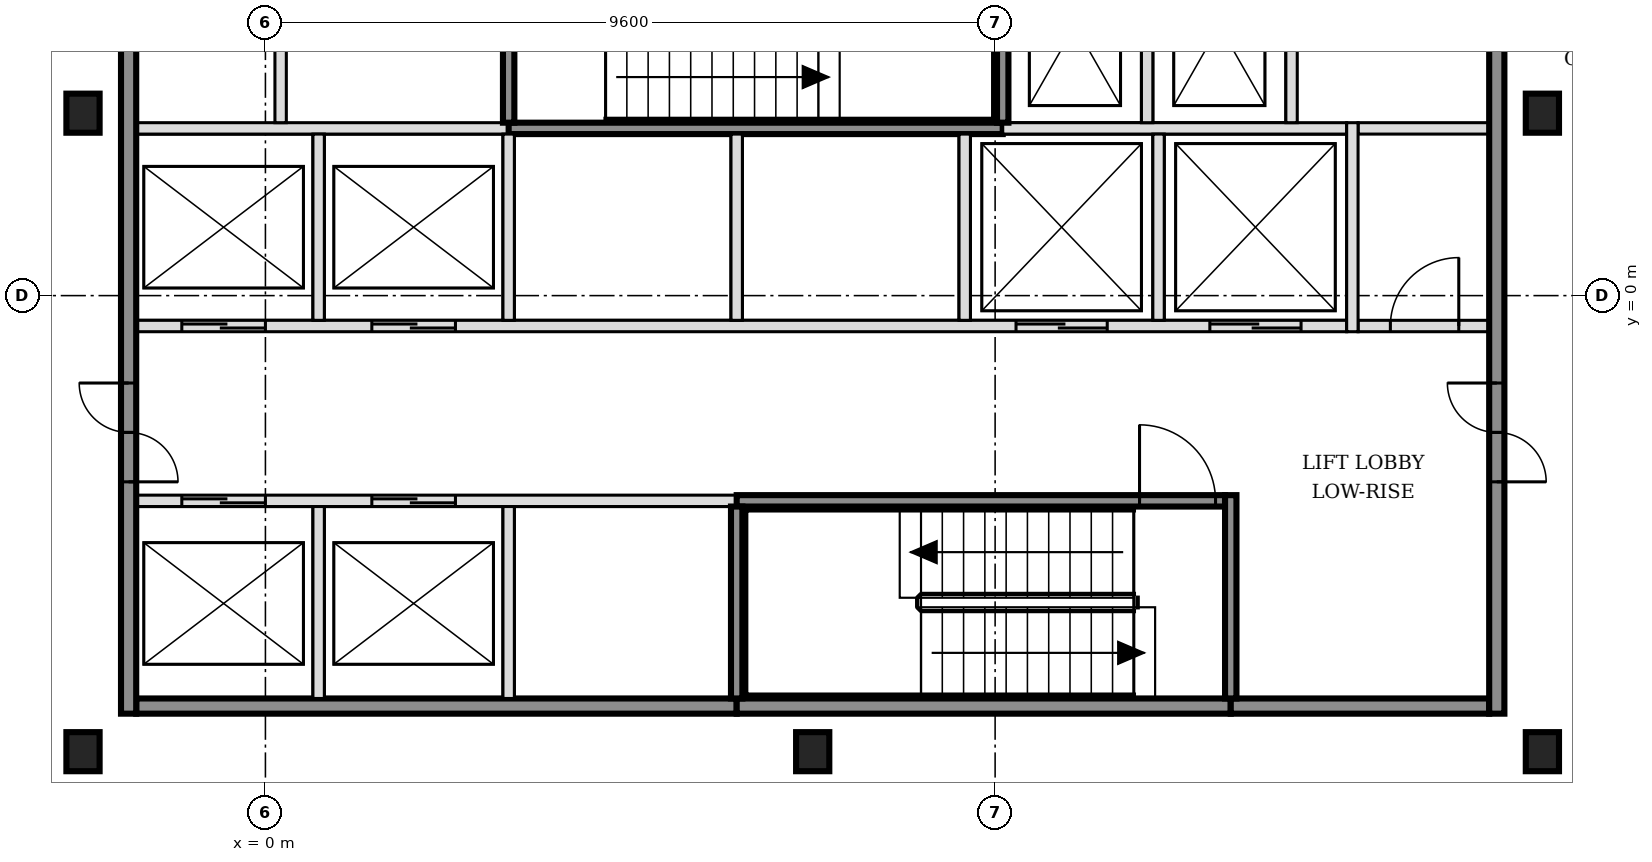
"""IFC4 building model, lengths in metres.
Left out: names, types, materials, properties, quantities, classifications, styles, units other than length and angle.
Written with IfcOpenShell. Run it as: python <this file> out.ifc"""

import sys

from ifc_helpers import new_model, si_unit, direction, frame, frame_2d, origin, origin_2d, place, context, subcontext, project, spatial, rectangle, i_section, extrude, element, fill, save


model = new_model("IFC4")
c1 = context("Model", 3, precision=1e-05, world=origin(), true_north=direction((0.0, 1.0)))
c2 = subcontext(c1, "Body", "Model", "MODEL_VIEW")
j1 = project(units=[si_unit("LENGTHUNIT", "METRE"), si_unit("PLANEANGLEUNIT", "RADIAN")], contexts=[c1])
p1 = place(None, origin())
s1 = spatial("IfcSite", under=j1, at=p1, CompositionType="ELEMENT")
p2 = place(p1, origin())
s2 = spatial("IfcBuilding", under=s1, at=p2, CompositionType="ELEMENT")
p3 = place(p2, frame((0.0, 0.0, 69.0)))
s3 = spatial("IfcBuildingStorey", under=s2, at=p3, CompositionType="ELEMENT", Elevation=69.0)
for number, where, z_axis, x_axis in (
    (1, (-2.4, -6.0, -0.15), (0.0, 0.0, 1.0), (1.0, 0.0, 0.0)),
    (2, (7.2, -6.0, -0.15), (0.0, 0.0, 1.0), (1.0, 0.0, 0.0)),
    (3, (16.8, -6.0, -0.15), (0.0, 0.0, 1.0), (1.0, 0.0, 0.0)),
    (4, (-2.4, 2.4, -0.15), (0.0, 0.0, 1.0), (1.0, 0.0, 0.0)),
    (5, (16.8, 2.4, -0.15), (0.0, 0.0, 1.0), (1.0, 0.0, 0.0)),
):
    element("IfcColumn", number, at=place(p3, frame(where, z_axis=z_axis, x_axis=x_axis)), inside=s3, PredefinedType="COLUMN", context=c2, shape_type="SweptSolid", body=[
        extrude(i_section(OverallWidth=0.437, OverallDepth=0.514, WebThickness=0.061, FlangeThickness=0.097, FilletRadius=0.015, at=origin_2d()), origin(), (0.0, 0.0, 1.0), 3.6),
    ])
p4 = place(p3, frame((-1.7, -5.4, 0.0), z_axis=(0.0, 0.0, 1.0), x_axis=(1.0, 0.0, 0.0)))
e6 = element("IfcWall", 6, at=p4, inside=s3, PredefinedType="SOLIDWALL", context=c2, shape_type="SweptSolid", body=[
    extrude(rectangle(XDim=7.9, YDim=0.2, at=frame_2d((3.95, 0.0))), origin(), (0.0, 0.0, 1.0), 3.45),
])
p5 = place(p3, frame((6.2, -5.4, 0.0), z_axis=(0.0, 0.0, 1.0), x_axis=(1.0, 0.0, 0.0)))
e7 = element("IfcWall", 7, at=p5, inside=s3, PredefinedType="SOLIDWALL", context=c2, shape_type="SweptSolid", body=[
    extrude(rectangle(XDim=6.5, YDim=0.2, at=frame_2d((3.25, 0.0))), origin(), (0.0, 0.0, 1.0), 3.45),
])
p6 = place(p3, frame((12.7, -5.4, 0.0), z_axis=(0.0, 0.0, 1.0), x_axis=(1.0, 0.0, 0.0)))
e8 = element("IfcWall", 8, at=p6, inside=s3, PredefinedType="SOLIDWALL", context=c2, shape_type="SweptSolid", body=[
    extrude(rectangle(XDim=3.4, YDim=0.2, at=frame_2d((1.7, 0.0))), origin(), (0.0, 0.0, 1.0), 3.45),
])
p7 = place(p3, frame((-1.7, -2.7, 0.0), z_axis=(0.0, 0.0, 1.0), x_axis=(1.0, 0.0, 0.0)))
e9 = element("IfcWall", 9, at=p7, inside=s3, PredefinedType="SOLIDWALL", context=c2, shape_type="SweptSolid", body=[
    extrude(rectangle(XDim=7.9, YDim=0.15, at=frame_2d((3.95, 0.0))), origin(), (0.0, 0.0, 1.0), 3.45),
])
p8 = place(p7, frame((0.6, 0.0, 0.0)))
e10 = element("IfcOpeningElement", 10, at=p8, cuts=e9, PredefinedType="OPENING", context=c2, shape_type="SweptSolid", body=[
    extrude(rectangle(XDim=1.1, YDim=2.1, at=frame_2d((0.55, 1.05))), frame((0.0, 0.085, 0.0), z_axis=(0.0, -1.0, 0.0), x_axis=(1.0, 0.0, 0.0)), (0.0, 0.0, 1.0), 0.17),
])
p9 = place(p7, frame((3.1, 0.0, 0.0)))
e11 = element("IfcOpeningElement", 11, at=p9, cuts=e9, PredefinedType="OPENING", context=c2, shape_type="SweptSolid", body=[
    extrude(rectangle(XDim=1.1, YDim=2.1, at=frame_2d((0.55, 1.05))), frame((0.0, 0.085, 0.0), z_axis=(0.0, -1.0, 0.0), x_axis=(1.0, 0.0, 0.0)), (0.0, 0.0, 1.0), 0.17),
])
p10 = place(p3, frame((6.2, -2.7, 0.0), z_axis=(0.0, 0.0, 1.0), x_axis=(1.0, 0.0, 0.0)))
e12 = element("IfcWall", 12, at=p10, inside=s3, PredefinedType="SOLIDWALL", context=c2, shape_type="SweptSolid", body=[
    extrude(rectangle(XDim=6.425, YDim=0.15, at=frame_2d((3.212, 0.0))), origin(), (0.0, 0.0, 1.0), 3.45),
])
p11 = place(p10, frame((5.3, 0.0, 0.0)))
e13 = element("IfcOpeningElement", 13, at=p11, cuts=e12, PredefinedType="OPENING", context=c2, shape_type="SweptSolid", body=[
    extrude(rectangle(XDim=1.0, YDim=2.1, at=frame_2d((0.5, 1.05))), frame((0.0, 0.085, 0.0), z_axis=(0.0, -1.0, 0.0), x_axis=(1.0, 0.0, 0.0)), (0.0, 0.0, 1.0), 0.17),
])
p12 = place(p3, frame((-1.7, -0.4, 0.0), z_axis=(0.0, 0.0, 1.0), x_axis=(1.0, 0.0, 0.0)))
e14 = element("IfcWall", 14, at=p12, inside=s3, PredefinedType="SOLIDWALL", context=c2, shape_type="SweptSolid", body=[
    extrude(rectangle(XDim=15.925, YDim=0.15, at=frame_2d((7.962, 0.0))), origin(), (0.0, 0.0, 1.0), 3.45),
])
p13 = place(p12, frame((0.6, 0.0, 0.0)))
e15 = element("IfcOpeningElement", 15, at=p13, cuts=e14, PredefinedType="OPENING", context=c2, shape_type="SweptSolid", body=[
    extrude(rectangle(XDim=1.1, YDim=2.1, at=frame_2d((0.55, 1.05))), frame((0.0, 0.085, 0.0), z_axis=(0.0, -1.0, 0.0), x_axis=(1.0, 0.0, 0.0)), (0.0, 0.0, 1.0), 0.17),
])
p14 = place(p12, frame((3.1, 0.0, 0.0)))
e16 = element("IfcOpeningElement", 16, at=p14, cuts=e14, PredefinedType="OPENING", context=c2, shape_type="SweptSolid", body=[
    extrude(rectangle(XDim=1.1, YDim=2.1, at=frame_2d((0.55, 1.05))), frame((0.0, 0.085, 0.0), z_axis=(0.0, -1.0, 0.0), x_axis=(1.0, 0.0, 0.0)), (0.0, 0.0, 1.0), 0.17),
])
p15 = place(p12, frame((11.575, 0.0, 0.0)))
e17 = element("IfcOpeningElement", 17, at=p15, cuts=e14, PredefinedType="OPENING", context=c2, shape_type="SweptSolid", body=[
    extrude(rectangle(XDim=1.2, YDim=2.1, at=frame_2d((0.6, 1.05))), frame((0.0, 0.085, 0.0), z_axis=(0.0, -1.0, 0.0), x_axis=(1.0, 0.0, 0.0)), (0.0, 0.0, 1.0), 0.17),
])
p16 = place(p12, frame((14.125, 0.0, 0.0)))
e18 = element("IfcOpeningElement", 18, at=p16, cuts=e14, PredefinedType="OPENING", context=c2, shape_type="SweptSolid", body=[
    extrude(rectangle(XDim=1.2, YDim=2.1, at=frame_2d((0.6, 1.05))), frame((0.0, 0.085, 0.0), z_axis=(0.0, -1.0, 0.0), x_axis=(1.0, 0.0, 0.0)), (0.0, 0.0, 1.0), 0.17),
])
p17 = place(p3, frame((14.375, -0.4, 0.0), z_axis=(0.0, 0.0, 1.0), x_axis=(1.0, 0.0, 0.0)))
e19 = element("IfcWall", 19, at=p17, inside=s3, PredefinedType="PARTITIONING", context=c2, shape_type="SweptSolid", body=[
    extrude(rectangle(XDim=1.725, YDim=0.15, at=frame_2d((0.863, 0.0))), origin(), (0.0, 0.0, 1.0), 3.45),
])
p18 = place(p17, frame((0.425, 0.0, 0.0)))
e20 = element("IfcOpeningElement", 20, at=p18, cuts=e19, PredefinedType="OPENING", context=c2, shape_type="SweptSolid", body=[
    extrude(rectangle(XDim=0.9, YDim=2.1, at=frame_2d((0.45, 1.05))), frame((0.0, 0.085, 0.0), z_axis=(0.0, -1.0, 0.0), x_axis=(1.0, 0.0, 0.0)), (0.0, 0.0, 1.0), 0.17),
])
p19 = place(p3, frame((-1.7, 2.2, 0.0), z_axis=(0.0, 0.0, 1.0), x_axis=(1.0, 0.0, 0.0)))
e21 = element("IfcWall", 21, at=p19, inside=s3, PredefinedType="SOLIDWALL", context=c2, shape_type="SweptSolid", body=[
    extrude(rectangle(XDim=4.9, YDim=0.15, at=frame_2d((2.45, 0.0))), origin(), (0.0, 0.0, 1.0), 3.45),
])
p20 = place(p3, frame((3.2, 2.2, 0.0), z_axis=(0.0, 0.0, 1.0), x_axis=(1.0, 0.0, 0.0)))
e22 = element("IfcWall", 22, at=p20, inside=s3, PredefinedType="SOLIDWALL", context=c2, shape_type="SweptSolid", body=[
    extrude(rectangle(XDim=6.5, YDim=0.15, at=frame_2d((3.25, 0.0))), origin(), (0.0, 0.0, 1.0), 3.45),
])
p21 = place(p3, frame((9.7, 2.2, 0.0), z_axis=(0.0, 0.0, 1.0), x_axis=(1.0, 0.0, 0.0)))
e23 = element("IfcWall", 23, at=p21, inside=s3, PredefinedType="SOLIDWALL", context=c2, shape_type="SweptSolid", body=[
    extrude(rectangle(XDim=4.525, YDim=0.15, at=frame_2d((2.263, 0.0))), origin(), (0.0, 0.0, 1.0), 3.45),
])
p22 = place(p3, frame((14.375, 2.2, 0.0), z_axis=(0.0, 0.0, 1.0), x_axis=(1.0, 0.0, 0.0)))
e24 = element("IfcWall", 24, at=p22, inside=s3, PredefinedType="PARTITIONING", context=c2, shape_type="SweptSolid", body=[
    extrude(rectangle(XDim=1.725, YDim=0.15, at=frame_2d((0.863, 0.0))), origin(), (0.0, 0.0, 1.0), 3.45),
])
p23 = place(p3, frame((-1.8, -5.5, 0.0), z_axis=(0.0, 0.0, 1.0), x_axis=(0.0, 1.0, 0.0)))
e25 = element("IfcWall", 25, at=p23, inside=s3, PredefinedType="SOLIDWALL", context=c2, shape_type="SweptSolid", body=[
    extrude(rectangle(XDim=15.8, YDim=0.2, at=frame_2d((7.9, 0.0))), origin(), (0.0, 0.0, 1.0), 3.45),
])
p24 = place(p23, frame((3.05, 0.0, 0.0)))
e26 = element("IfcOpeningElement", 26, at=p24, cuts=e25, PredefinedType="OPENING", context=c2, shape_type="SweptSolid", body=[
    extrude(rectangle(XDim=1.3, YDim=2.1, at=frame_2d((0.65, 1.05))), frame((0.0, 0.11, 0.0), z_axis=(0.0, -1.0, 0.0), x_axis=(1.0, 0.0, 0.0)), (0.0, 0.0, 1.0), 0.22),
])
p25 = place(p23, frame((11.45, 0.0, 0.0)))
e27 = element("IfcOpeningElement", 27, at=p25, cuts=e25, PredefinedType="OPENING", context=c2, shape_type="SweptSolid", body=[
    extrude(rectangle(XDim=1.3, YDim=2.1, at=frame_2d((0.65, 1.05))), frame((0.0, 0.11, 0.0), z_axis=(0.0, -1.0, 0.0), x_axis=(1.0, 0.0, 0.0)), (0.0, 0.0, 1.0), 0.22),
])
p26 = place(p3, frame((0.2, 2.275, 0.0), z_axis=(0.0, 0.0, 1.0), x_axis=(0.0, 1.0, 0.0)))
e28 = element("IfcWall", 28, at=p26, inside=s3, PredefinedType="PARTITIONING", context=c2, shape_type="SweptSolid", body=[
    extrude(rectangle(XDim=2.55, YDim=0.15, at=frame_2d((1.275, 0.0))), origin(), (0.0, 0.0, 1.0), 3.45),
])
p27 = place(p3, frame((0.7, -5.3, 0.0), z_axis=(0.0, 0.0, 1.0), x_axis=(0.0, 1.0, 0.0)))
e29 = element("IfcWall", 29, at=p27, inside=s3, PredefinedType="SOLIDWALL", context=c2, shape_type="SweptSolid", body=[
    extrude(rectangle(XDim=2.525, YDim=0.15, at=frame_2d((1.263, 0.0))), origin(), (0.0, 0.0, 1.0), 3.45),
])
p28 = place(p3, frame((0.7, -0.325, 0.0), z_axis=(0.0, 0.0, 1.0), x_axis=(0.0, 1.0, 0.0)))
e30 = element("IfcWall", 30, at=p28, inside=s3, PredefinedType="SOLIDWALL", context=c2, shape_type="SweptSolid", body=[
    extrude(rectangle(XDim=2.45, YDim=0.15, at=frame_2d((1.225, 0.0))), origin(), (0.0, 0.0, 1.0), 3.45),
])
p29 = place(p3, frame((3.2, -5.3, 0.0), z_axis=(0.0, 0.0, 1.0), x_axis=(0.0, 1.0, 0.0)))
e31 = element("IfcWall", 31, at=p29, inside=s3, PredefinedType="SOLIDWALL", context=c2, shape_type="SweptSolid", body=[
    extrude(rectangle(XDim=2.525, YDim=0.15, at=frame_2d((1.263, 0.0))), origin(), (0.0, 0.0, 1.0), 3.45),
])
p30 = place(p3, frame((3.2, -0.325, 0.0), z_axis=(0.0, 0.0, 1.0), x_axis=(0.0, 1.0, 0.0)))
e32 = element("IfcWall", 32, at=p30, inside=s3, PredefinedType="SOLIDWALL", context=c2, shape_type="SweptSolid", body=[
    extrude(rectangle(XDim=2.45, YDim=0.15, at=frame_2d((1.225, 0.0))), origin(), (0.0, 0.0, 1.0), 3.45),
])
p31 = place(p3, frame((3.2, 2.275, 0.0), z_axis=(0.0, 0.0, 1.0), x_axis=(0.0, 1.0, 0.0)))
e33 = element("IfcWall", 33, at=p31, inside=s3, PredefinedType="SOLIDWALL", context=c2, shape_type="SweptSolid", body=[
    extrude(rectangle(XDim=2.7, YDim=0.15, at=frame_2d((1.35, 0.0))), origin(), (0.0, 0.0, 1.0), 3.45),
])
p32 = place(p3, frame((6.2, -5.3, 0.0), z_axis=(0.0, 0.0, 1.0), x_axis=(0.0, 1.0, 0.0)))
e34 = element("IfcWall", 34, at=p32, inside=s3, PredefinedType="SOLIDWALL", context=c2, shape_type="SweptSolid", body=[
    extrude(rectangle(XDim=2.525, YDim=0.15, at=frame_2d((1.263, 0.0))), origin(), (0.0, 0.0, 1.0), 3.45),
])
for number, where, z_axis, x_axis in (
    (35, (6.2, -0.325, 0.0), (0.0, 0.0, 1.0), (0.0, 1.0, 0.0)),
    (36, (9.2, -0.325, 0.0), (0.0, 0.0, 1.0), (0.0, 1.0, 0.0)),
):
    element("IfcWall", number, at=place(p3, frame(where, z_axis=z_axis, x_axis=x_axis)), inside=s3, PredefinedType="SOLIDWALL", context=c2, shape_type="SweptSolid", body=[
        extrude(rectangle(XDim=2.45, YDim=0.15, at=frame_2d((1.225, 0.0))), origin(), (0.0, 0.0, 1.0), 3.45),
    ])
for number, where, z_axis, x_axis in (
    (37, (9.7, 2.275, 0.0), (0.0, 0.0, 1.0), (0.0, 1.0, 0.0)),
    (38, (11.6, 2.275, 0.0), (0.0, 0.0, 1.0), (0.0, 1.0, 0.0)),
):
    element("IfcWall", number, at=place(p3, frame(where, z_axis=z_axis, x_axis=x_axis)), inside=s3, PredefinedType="SOLIDWALL", context=c2, shape_type="SweptSolid", body=[
        extrude(rectangle(XDim=2.55, YDim=0.15, at=frame_2d((1.275, 0.0))), origin(), (0.0, 0.0, 1.0), 3.45),
    ])
p33 = place(p3, frame((11.75, -0.325, 0.0), z_axis=(0.0, 0.0, 1.0), x_axis=(0.0, 1.0, 0.0)))
e39 = element("IfcWall", 39, at=p33, inside=s3, PredefinedType="SOLIDWALL", context=c2, shape_type="SweptSolid", body=[
    extrude(rectangle(XDim=2.45, YDim=0.15, at=frame_2d((1.225, 0.0))), origin(), (0.0, 0.0, 1.0), 3.45),
])
p34 = place(p3, frame((12.7, -5.3, 0.0), z_axis=(0.0, 0.0, 1.0), x_axis=(0.0, 1.0, 0.0)))
e40 = element("IfcWall", 40, at=p34, inside=s3, PredefinedType="SOLIDWALL", context=c2, shape_type="SweptSolid", body=[
    extrude(rectangle(XDim=2.675, YDim=0.15, at=frame_2d((1.337, 0.0))), origin(), (0.0, 0.0, 1.0), 3.45),
])
p35 = place(p3, frame((13.5, 2.275, 0.0), z_axis=(0.0, 0.0, 1.0), x_axis=(0.0, 1.0, 0.0)))
e41 = element("IfcWall", 41, at=p35, inside=s3, PredefinedType="SOLIDWALL", context=c2, shape_type="SweptSolid", body=[
    extrude(rectangle(XDim=2.55, YDim=0.15, at=frame_2d((1.275, 0.0))), origin(), (0.0, 0.0, 1.0), 3.45),
])
p36 = place(p3, frame((14.3, -0.475, 0.0), z_axis=(0.0, 0.0, 1.0), x_axis=(0.0, 1.0, 0.0)))
e42 = element("IfcWall", 42, at=p36, inside=s3, PredefinedType="SOLIDWALL", context=c2, shape_type="SweptSolid", body=[
    extrude(rectangle(XDim=2.75, YDim=0.15, at=frame_2d((1.375, 0.0))), origin(), (0.0, 0.0, 1.0), 3.45),
])
p37 = place(p3, frame((16.2, -5.5, 0.0), z_axis=(0.0, 0.0, 1.0), x_axis=(0.0, 1.0, 0.0)))
e43 = element("IfcWall", 43, at=p37, inside=s3, PredefinedType="SOLIDWALL", context=c2, shape_type="SweptSolid", body=[
    extrude(rectangle(XDim=15.8, YDim=0.2, at=frame_2d((7.9, 0.0))), origin(), (0.0, 0.0, 1.0), 3.45),
])
p38 = place(p37, frame((3.05, 0.0, 0.0)))
e44 = element("IfcOpeningElement", 44, at=p38, cuts=e43, PredefinedType="OPENING", context=c2, shape_type="SweptSolid", body=[
    extrude(rectangle(XDim=1.3, YDim=2.1, at=frame_2d((0.65, 1.05))), frame((0.0, 0.11, 0.0), z_axis=(0.0, -1.0, 0.0), x_axis=(1.0, 0.0, 0.0)), (0.0, 0.0, 1.0), 0.22),
])
p39 = place(p37, frame((11.45, 0.0, 0.0)))
e45 = element("IfcOpeningElement", 45, at=p39, cuts=e43, PredefinedType="OPENING", context=c2, shape_type="SweptSolid", body=[
    extrude(rectangle(XDim=1.3, YDim=2.1, at=frame_2d((0.65, 1.05))), frame((0.0, 0.11, 0.0), z_axis=(0.0, -1.0, 0.0), x_axis=(1.0, 0.0, 0.0)), (0.0, 0.0, 1.0), 0.22),
])
p40 = place(p8, origin())
e46 = element("IfcDoor", 46, at=p40, inside=s3, OperationType="DOUBLE_DOOR_SLIDING", PredefinedType="DOOR", context=c2, shape_type="SweptSolid", body=[
    extrude(rectangle(XDim=1.1, YDim=2.1, at=frame_2d((0.55, 1.05))), frame((0.0, 0.025, 0.0), z_axis=(0.0, -1.0, 0.0), x_axis=(1.0, 0.0, 0.0)), (0.0, 0.0, 1.0), 0.05),
])
fill(e10, e46)
p41 = place(p9, origin())
e47 = element("IfcDoor", 47, at=p41, inside=s3, OperationType="DOUBLE_DOOR_SLIDING", PredefinedType="DOOR", context=c2, shape_type="SweptSolid", body=[
    extrude(rectangle(XDim=1.1, YDim=2.1, at=frame_2d((0.55, 1.05))), frame((0.0, 0.025, 0.0), z_axis=(0.0, -1.0, 0.0), x_axis=(1.0, 0.0, 0.0)), (0.0, 0.0, 1.0), 0.05),
])
fill(e11, e47)
p42 = place(p13, origin())
e48 = element("IfcDoor", 48, at=p42, inside=s3, OperationType="DOUBLE_DOOR_SLIDING", PredefinedType="DOOR", context=c2, shape_type="SweptSolid", body=[
    extrude(rectangle(XDim=1.1, YDim=2.1, at=frame_2d((0.55, 1.05))), frame((0.0, 0.025, 0.0), z_axis=(0.0, -1.0, 0.0), x_axis=(1.0, 0.0, 0.0)), (0.0, 0.0, 1.0), 0.05),
])
fill(e15, e48)
p43 = place(p14, origin())
e49 = element("IfcDoor", 49, at=p43, inside=s3, OperationType="DOUBLE_DOOR_SLIDING", PredefinedType="DOOR", context=c2, shape_type="SweptSolid", body=[
    extrude(rectangle(XDim=1.1, YDim=2.1, at=frame_2d((0.55, 1.05))), frame((0.0, 0.025, 0.0), z_axis=(0.0, -1.0, 0.0), x_axis=(1.0, 0.0, 0.0)), (0.0, 0.0, 1.0), 0.05),
])
fill(e16, e49)
p44 = place(p15, origin())
e50 = element("IfcDoor", 50, at=p44, inside=s3, OperationType="DOUBLE_DOOR_SLIDING", PredefinedType="DOOR", context=c2, shape_type="SweptSolid", body=[
    extrude(rectangle(XDim=1.2, YDim=2.1, at=frame_2d((0.6, 1.05))), frame((0.0, 0.025, 0.0), z_axis=(0.0, -1.0, 0.0), x_axis=(1.0, 0.0, 0.0)), (0.0, 0.0, 1.0), 0.05),
])
fill(e17, e50)
p45 = place(p16, origin())
e51 = element("IfcDoor", 51, at=p45, inside=s3, OperationType="DOUBLE_DOOR_SLIDING", PredefinedType="DOOR", context=c2, shape_type="SweptSolid", body=[
    extrude(rectangle(XDim=1.2, YDim=2.1, at=frame_2d((0.6, 1.05))), frame((0.0, 0.025, 0.0), z_axis=(0.0, -1.0, 0.0), x_axis=(1.0, 0.0, 0.0)), (0.0, 0.0, 1.0), 0.05),
])
fill(e18, e51)
p46 = place(p11, origin())
e52 = element("IfcDoor", 52, at=p46, inside=s3, OperationType="SINGLE_SWING_LEFT", PredefinedType="DOOR", context=c2, shape_type="SweptSolid", body=[
    extrude(rectangle(XDim=1.0, YDim=2.1, at=frame_2d((0.5, 1.05))), frame((0.0, 0.025, 0.0), z_axis=(0.0, -1.0, 0.0), x_axis=(1.0, 0.0, 0.0)), (0.0, 0.0, 1.0), 0.05),
])
fill(e13, e52)
p47 = place(p24, origin())
e53 = element("IfcDoor", 53, at=p47, inside=s3, OperationType="DOUBLE_DOOR_SINGLE_SWING", PredefinedType="DOOR", context=c2, shape_type="SweptSolid", body=[
    extrude(rectangle(XDim=1.3, YDim=2.1, at=frame_2d((0.65, 1.05))), frame((0.0, 0.025, 0.0), z_axis=(0.0, -1.0, 0.0), x_axis=(1.0, 0.0, 0.0)), (0.0, 0.0, 1.0), 0.05),
])
fill(e26, e53)
p48 = place(p38, origin())
e54 = element("IfcDoor", 54, at=p48, inside=s3, OperationType="DOUBLE_DOOR_SINGLE_SWING", PredefinedType="DOOR", context=c2, shape_type="SweptSolid", body=[
    extrude(rectangle(XDim=1.3, YDim=2.1, at=frame_2d((0.65, 1.05))), frame((0.0, 0.025, 0.0), z_axis=(0.0, -1.0, 0.0), x_axis=(1.0, 0.0, 0.0)), (0.0, 0.0, 1.0), 0.05),
])
fill(e44, e54)
p49 = place(p18, origin())
e55 = element("IfcDoor", 55, at=p49, inside=s3, OperationType="SINGLE_SWING_RIGHT", PredefinedType="DOOR", context=c2, shape_type="SweptSolid", body=[
    extrude(rectangle(XDim=0.9, YDim=2.1, at=frame_2d((0.45, 1.05))), frame((0.0, 0.025, 0.0), z_axis=(0.0, -1.0, 0.0), x_axis=(1.0, 0.0, 0.0)), (0.0, 0.0, 1.0), 0.05),
])
fill(e20, e55)
save(model, sys.argv[1])
